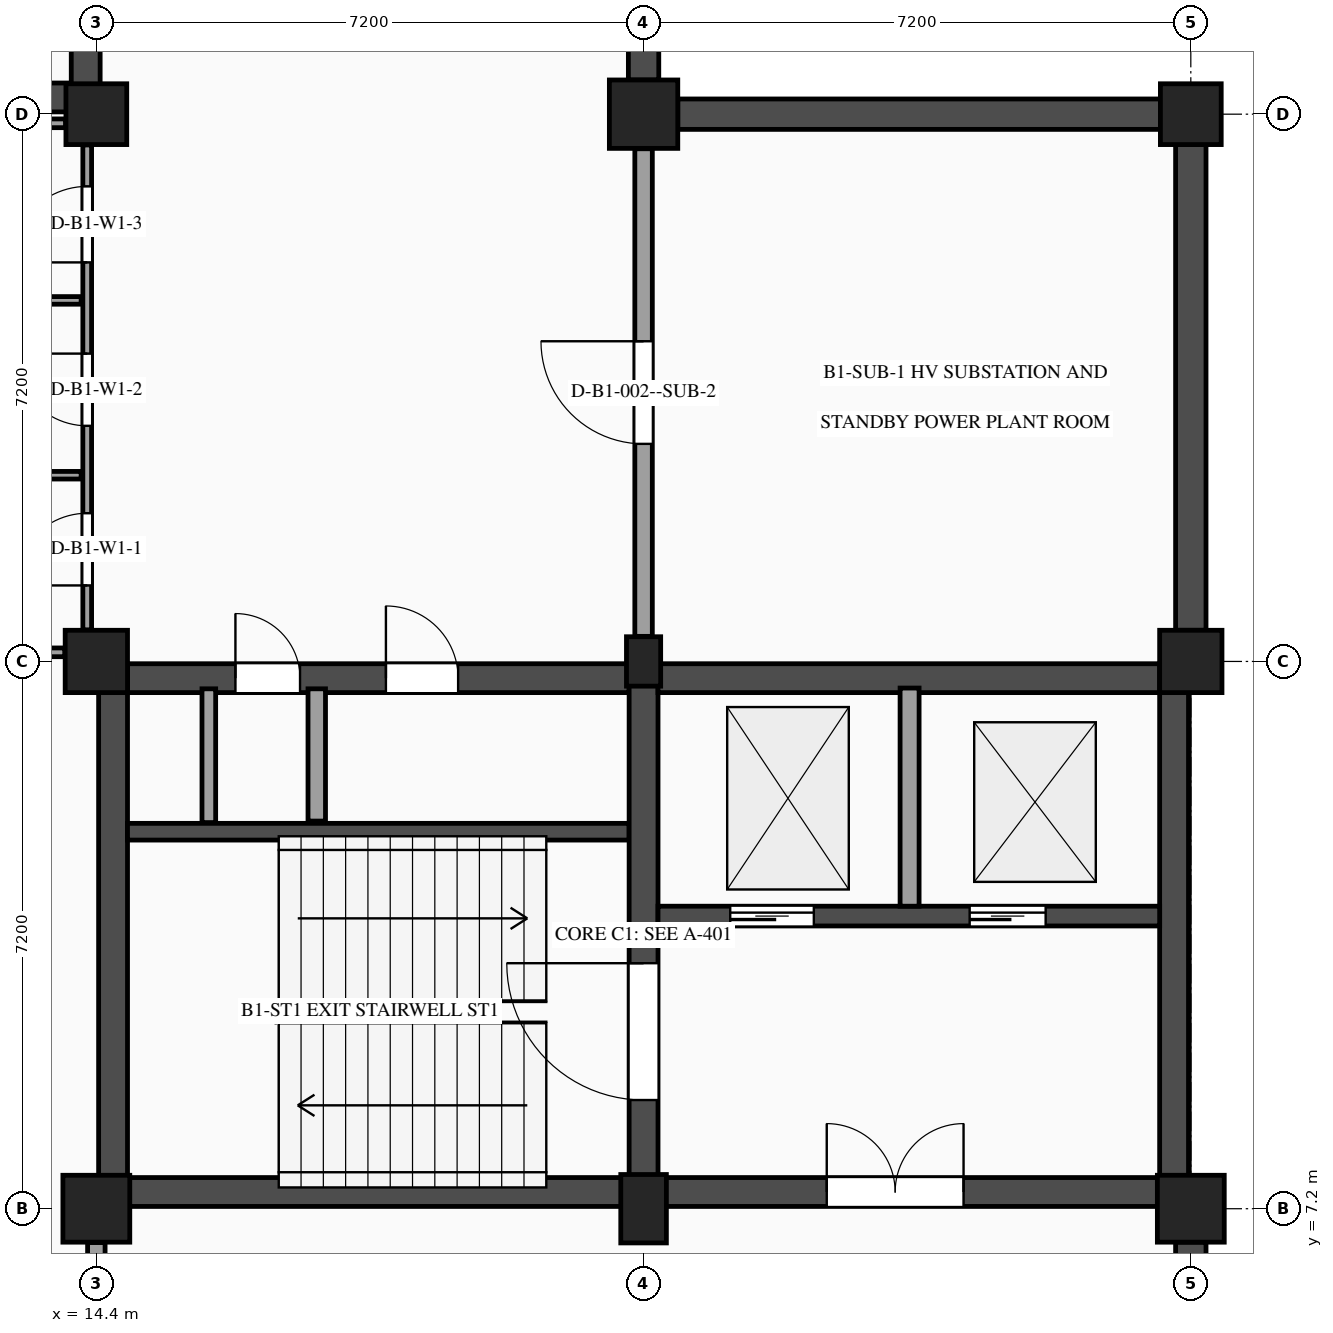
"""IFC4 building model, lengths in metres.
Left out: names, types, materials, properties, quantities, classifications, styles, units other than length and angle.
Written with IfcOpenShell. Run it as: python <this file> out.ifc"""

import sys

from ifc_helpers import new_model, si_unit, direction, frame, frame_2d, origin, origin_2d, place, context, subcontext, project, spatial, rectangle, extrude, element, fill, save


model = new_model("IFC4")
c1 = context("Model", 3, precision=1e-05, world=origin(), true_north=direction((0.0, 1.0)))
c2 = subcontext(c1, "Body", "Model", "MODEL_VIEW")
j1 = project(units=[si_unit("LENGTHUNIT", "METRE"), si_unit("PLANEANGLEUNIT", "RADIAN")], contexts=[c1])
p1 = place(None, origin())
s1 = spatial("IfcSite", under=j1, at=p1, CompositionType="ELEMENT")
p2 = place(p1, origin())
s2 = spatial("IfcBuilding", under=s1, at=p2, CompositionType="ELEMENT")
p3 = place(p2, frame((0.0, 0.0, -4.5)))
s3 = spatial("IfcBuildingStorey", under=s2, at=p3, CompositionType="ELEMENT", Elevation=-4.5)
p4 = place(p3, frame((14.4, 7.2, -0.45), z_axis=(0.0, 0.0, 1.0), x_axis=(1.0, 0.0, 0.0)))
e1 = element("IfcColumn", 1, at=p4, inside=s3, PredefinedType="COLUMN", context=c2, shape_type="SweptSolid", body=[
    extrude(rectangle(XDim=0.88, YDim=0.88, at=origin_2d()), origin(), (0.0, 0.0, 1.0), 4.95),
])
p5 = place(p3, frame((14.4, 14.4, -0.45), z_axis=(0.0, 0.0, 1.0), x_axis=(1.0, 0.0, 0.0)))
e2 = element("IfcColumn", 2, at=p5, inside=s3, PredefinedType="COLUMN", context=c2, shape_type="SweptSolid", body=[
    extrude(rectangle(XDim=0.82, YDim=0.82, at=origin_2d()), origin(), (0.0, 0.0, 1.0), 4.95),
])
p6 = place(p3, frame((14.4, 21.6, -0.45), z_axis=(0.0, 0.0, 1.0), x_axis=(1.0, 0.0, 0.0)))
e3 = element("IfcColumn", 3, at=p6, inside=s3, PredefinedType="COLUMN", context=c2, shape_type="SweptSolid", body=[
    extrude(rectangle(XDim=0.8, YDim=0.8, at=origin_2d()), origin(), (0.0, 0.0, 1.0), 4.95),
])
p7 = place(p3, frame((21.6, 7.2, -0.45), z_axis=(0.0, 0.0, 1.0), x_axis=(1.0, 0.0, 0.0)))
e4 = element("IfcColumn", 4, at=p7, inside=s3, PredefinedType="COLUMN", context=c2, shape_type="SweptSolid", body=[
    extrude(rectangle(XDim=0.6, YDim=0.9, at=origin_2d()), origin(), (0.0, 0.0, 1.0), 4.95),
])
p8 = place(p3, frame((21.6, 14.4, -0.45), z_axis=(0.0, 0.0, 1.0), x_axis=(1.0, 0.0, 0.0)))
e5 = element("IfcColumn", 5, at=p8, inside=s3, PredefinedType="PILASTER", context=c2, shape_type="SweptSolid", body=[
    extrude(rectangle(XDim=0.45, YDim=0.65, at=origin_2d()), origin(), (0.0, 0.0, 1.0), 4.95),
])
p9 = place(p3, frame((21.6, 21.6, -0.45), z_axis=(0.0, 0.0, 1.0), x_axis=(1.0, 0.0, 0.0)))
e6 = element("IfcColumn", 6, at=p9, inside=s3, PredefinedType="COLUMN", context=c2, shape_type="SweptSolid", body=[
    extrude(rectangle(XDim=0.9, YDim=0.9, at=origin_2d()), origin(), (0.0, 0.0, 1.0), 4.95),
])
p10 = place(p3, frame((28.8, 7.2, -0.45), z_axis=(0.0, 0.0, 1.0), x_axis=(1.0, 0.0, 0.0)))
e7 = element("IfcColumn", 7, at=p10, inside=s3, PredefinedType="COLUMN", context=c2, shape_type="SweptSolid", body=[
    extrude(rectangle(XDim=0.88, YDim=0.88, at=origin_2d()), origin(), (0.0, 0.0, 1.0), 4.95),
])
p11 = place(p3, frame((28.8, 14.4, -0.45), z_axis=(0.0, 0.0, 1.0), x_axis=(1.0, 0.0, 0.0)))
e8 = element("IfcColumn", 8, at=p11, inside=s3, PredefinedType="COLUMN", context=c2, shape_type="SweptSolid", body=[
    extrude(rectangle(XDim=0.82, YDim=0.82, at=origin_2d()), origin(), (0.0, 0.0, 1.0), 4.95),
])
p12 = place(p3, frame((28.8, 21.6, -0.45), z_axis=(0.0, 0.0, 1.0), x_axis=(1.0, 0.0, 0.0)))
e9 = element("IfcColumn", 9, at=p12, inside=s3, PredefinedType="COLUMN", context=c2, shape_type="SweptSolid", body=[
    extrude(rectangle(XDim=0.8, YDim=0.8, at=origin_2d()), origin(), (0.0, 0.0, 1.0), 4.95),
])
p13 = place(p3, frame((21.6, 28.36, 0.0), z_axis=(0.0, 0.0, 1.0), x_axis=(0.0, -1.0, 0.0)))
e10 = element("IfcWall", 10, at=p13, inside=s3, PredefinedType="SOLIDWALL", context=c2, shape_type="SweptSolid", body=[
    extrude(rectangle(XDim=6.31, YDim=0.4, at=frame_2d((3.155, 0.0))), origin(), (0.0, 0.0, 1.0), 4.17),
])
p14 = place(p3, frame((22.05, 21.6, 0.0), z_axis=(0.0, 0.0, 1.0), x_axis=(1.0, 0.0, 0.0)))
e11 = element("IfcWall", 11, at=p14, inside=s3, PredefinedType="SOLIDWALL", context=c2, shape_type="SweptSolid", body=[
    extrude(rectangle(XDim=6.35, YDim=0.4, at=frame_2d((3.175, 0.0))), origin(), (0.0, 0.0, 1.0), 4.17),
])
p15 = place(p3, frame((28.8, 21.2, 0.0), z_axis=(0.0, 0.0, 1.0), x_axis=(0.0, -1.0, 0.0)))
e12 = element("IfcWall", 12, at=p15, inside=s3, PredefinedType="SOLIDWALL", context=c2, shape_type="SweptSolid", body=[
    extrude(rectangle(XDim=6.39, YDim=0.4, at=frame_2d((3.195, 0.0))), origin(), (0.0, 0.0, 1.0), 4.17),
])
p16 = place(p3, frame((28.8, 6.76, 0.0), z_axis=(0.0, 0.0, 1.0), x_axis=(0.0, -1.0, 0.0)))
e13 = element("IfcWall", 13, at=p16, inside=s3, PredefinedType="SOLIDWALL", context=c2, shape_type="SweptSolid", body=[
    extrude(rectangle(XDim=6.31, YDim=0.4, at=frame_2d((3.155, 0.0))), origin(), (0.0, 0.0, 1.0), 4.17),
])
p17 = place(p3, frame((14.81, 7.42, 0.0), z_axis=(0.0, 0.0, 1.0), x_axis=(1.0, 0.0, 0.0)))
e14 = element("IfcWall", 14, at=p17, inside=s3, PredefinedType="SHEAR", context=c2, shape_type="SweptSolid", body=[
    extrude(rectangle(XDim=6.6, YDim=0.38, at=frame_2d((3.3, 0.0))), origin(), (0.0, 0.0, 1.0), 4.17),
])
p18 = place(p3, frame((14.62, 14.37, 0.0), z_axis=(0.0, 0.0, 1.0), x_axis=(0.0, -1.0, 0.0)))
e15 = element("IfcWall", 15, at=p18, inside=s3, PredefinedType="SHEAR", context=c2, shape_type="SweptSolid", body=[
    extrude(rectangle(XDim=7.14, YDim=0.38, at=frame_2d((3.57, 0.0))), origin(), (0.0, 0.0, 1.0), 4.17),
])
p19 = place(p3, frame((14.81, 14.18, 0.0), z_axis=(0.0, 0.0, 1.0), x_axis=(1.0, 0.0, 0.0)))
e16 = element("IfcWall", 16, at=p19, inside=s3, PredefinedType="SHEAR", context=c2, shape_type="SweptSolid", body=[
    extrude(rectangle(XDim=6.6, YDim=0.38, at=frame_2d((3.3, 0.0))), origin(), (0.0, 0.0, 1.0), 4.17),
])
p20 = place(p19, frame((1.42, 0.0, 0.0)))
e17 = element("IfcOpeningElement", 17, at=p20, cuts=e16, PredefinedType="OPENING", context=c2, shape_type="SweptSolid", body=[
    extrude(rectangle(XDim=0.85, YDim=2.1, at=frame_2d((0.425, 1.05))), frame((0.0, 0.2, 0.0), z_axis=(0.0, -1.0, 0.0), x_axis=(1.0, 0.0, 0.0)), (0.0, 0.0, 1.0), 0.4),
])
p21 = place(p19, frame((3.4, 0.0, 0.0)))
e18 = element("IfcOpeningElement", 18, at=p21, cuts=e16, PredefinedType="OPENING", context=c2, shape_type="SweptSolid", body=[
    extrude(rectangle(XDim=0.95, YDim=2.15, at=frame_2d((0.475, 1.075))), frame((0.0, 0.2, 0.0), z_axis=(0.0, -1.0, 0.0), x_axis=(1.0, 0.0, 0.0)), (0.0, 0.0, 1.0), 0.4),
])
p22 = place(p3, frame((14.81, 12.16, 0.0), z_axis=(0.0, 0.0, 1.0), x_axis=(1.0, 0.0, 0.0)))
e19 = element("IfcWall", 19, at=p22, inside=s3, PredefinedType="SHEAR", context=c2, shape_type="SweptSolid", body=[
    extrude(rectangle(XDim=6.6, YDim=0.22, at=frame_2d((3.3, 0.0))), origin(), (0.0, 0.0, 1.0), 4.17),
])
p23 = place(p3, frame((17.3, 12.3, 0.0), z_axis=(0.0, 0.0, 1.0), x_axis=(0.0, 1.0, 0.0)))
e20 = element("IfcWall", 20, at=p23, inside=s3, PredefinedType="PARTITIONING", context=c2, shape_type="SweptSolid", body=[
    extrude(rectangle(XDim=1.74, YDim=0.23, at=frame_2d((0.87, 0.0))), origin(), (0.0, 0.0, 1.0), 4.17),
])
p24 = place(p3, frame((15.88, 12.28, 0.0), z_axis=(0.0, 0.0, 1.0), x_axis=(0.0, 1.0, 0.0)))
e21 = element("IfcWall", 21, at=p24, inside=s3, PredefinedType="PARTITIONING", context=c2, shape_type="SweptSolid", body=[
    extrude(rectangle(XDim=1.76, YDim=0.18, at=frame_2d((0.88, 0.0))), origin(), (0.0, 0.0, 1.0), 4.17),
])
p25 = place(p3, frame((21.6, 7.23, 0.0), z_axis=(0.0, 0.0, 1.0), x_axis=(0.0, 1.0, 0.0)))
e22 = element("IfcWall", 22, at=p25, inside=s3, PredefinedType="SHEAR", context=c2, shape_type="SweptSolid", body=[
    extrude(rectangle(XDim=7.14, YDim=0.38, at=frame_2d((3.57, 0.0))), origin(), (0.0, 0.0, 1.0), 4.17),
])
p26 = place(p25, frame((1.4, 0.0, 0.0)))
e23 = element("IfcOpeningElement", 23, at=p26, cuts=e22, PredefinedType="OPENING", context=c2, shape_type="SweptSolid", body=[
    extrude(rectangle(XDim=1.8, YDim=2.2, at=frame_2d((0.9, 1.1))), frame((0.0, 0.2, 0.0), z_axis=(0.0, -1.0, 0.0), x_axis=(1.0, 0.0, 0.0)), (0.0, 0.0, 1.0), 0.4),
])
p27 = place(p3, frame((21.79, 7.42, 0.0), z_axis=(0.0, 0.0, 1.0), x_axis=(1.0, 0.0, 0.0)))
e24 = element("IfcWall", 24, at=p27, inside=s3, PredefinedType="SHEAR", context=c2, shape_type="SweptSolid", body=[
    extrude(rectangle(XDim=6.6, YDim=0.38, at=frame_2d((3.3, 0.0))), origin(), (0.0, 0.0, 1.0), 4.17),
])
p28 = place(p27, frame((2.22, 0.0, 0.0)))
e25 = element("IfcOpeningElement", 25, at=p28, cuts=e24, PredefinedType="OPENING", context=c2, shape_type="SweptSolid", body=[
    extrude(rectangle(XDim=1.8, YDim=2.2, at=frame_2d((0.9, 1.1))), frame((0.0, 0.2, 0.0), z_axis=(0.0, -1.0, 0.0), x_axis=(1.0, 0.0, 0.0)), (0.0, 0.0, 1.0), 0.4),
])
p29 = place(p3, frame((28.58, 7.23, 0.0), z_axis=(0.0, 0.0, 1.0), x_axis=(0.0, 1.0, 0.0)))
e26 = element("IfcWall", 26, at=p29, inside=s3, PredefinedType="SHEAR", context=c2, shape_type="SweptSolid", body=[
    extrude(rectangle(XDim=7.14, YDim=0.38, at=frame_2d((3.57, 0.0))), origin(), (0.0, 0.0, 1.0), 4.17),
])
p30 = place(p3, frame((21.79, 14.18, 0.0), z_axis=(0.0, 0.0, 1.0), x_axis=(1.0, 0.0, 0.0)))
e27 = element("IfcWall", 27, at=p30, inside=s3, PredefinedType="SHEAR", context=c2, shape_type="SweptSolid", body=[
    extrude(rectangle(XDim=6.6, YDim=0.38, at=frame_2d((3.3, 0.0))), origin(), (0.0, 0.0, 1.0), 4.17),
])
p31 = place(p3, frame((21.79, 11.05, 0.0), z_axis=(0.0, 0.0, 1.0), x_axis=(1.0, 0.0, 0.0)))
e28 = element("IfcWall", 28, at=p31, inside=s3, PredefinedType="SHEAR", context=c2, shape_type="SweptSolid", body=[
    extrude(rectangle(XDim=6.6, YDim=0.26, at=frame_2d((3.3, 0.0))), origin(), (0.0, 0.0, 1.0), 4.17),
])
p32 = place(p31, frame((0.95, 0.0, 0.0)))
e29 = element("IfcOpeningElement", 29, at=p32, cuts=e28, PredefinedType="OPENING", context=c2, shape_type="SweptSolid", body=[
    extrude(rectangle(XDim=1.1, YDim=2.2, at=frame_2d((0.55, 1.1))), frame((0.0, 0.14, 0.0), z_axis=(0.0, -1.0, 0.0), x_axis=(1.0, 0.0, 0.0)), (0.0, 0.0, 1.0), 0.28),
])
p33 = place(p31, frame((4.1, 0.0, 0.0)))
e30 = element("IfcOpeningElement", 30, at=p33, cuts=e28, PredefinedType="OPENING", context=c2, shape_type="SweptSolid", body=[
    extrude(rectangle(XDim=1.0, YDim=2.15, at=frame_2d((0.5, 1.075))), frame((0.0, 0.14, 0.0), z_axis=(0.0, -1.0, 0.0), x_axis=(1.0, 0.0, 0.0)), (0.0, 0.0, 1.0), 0.28),
])
p34 = place(p3, frame((25.1, 11.18, 0.0), z_axis=(0.0, 0.0, 1.0), x_axis=(0.0, 1.0, 0.0)))
e31 = element("IfcWall", 31, at=p34, inside=s3, PredefinedType="PARTITIONING", context=c2, shape_type="SweptSolid", body=[
    extrude(rectangle(XDim=2.87, YDim=0.25, at=frame_2d((1.435, 0.0))), origin(), (0.0, 0.0, 1.0), 4.17),
])
p35 = place(p3, frame((7.61, 21.82, 0.0), z_axis=(0.0, 0.0, 1.0), x_axis=(1.0, 0.0, 0.0)))
e32 = element("IfcWall", 32, at=p35, inside=s3, PredefinedType="SHEAR", context=c2, shape_type="SweptSolid", body=[
    extrude(rectangle(XDim=6.46, YDim=0.38, at=frame_2d((3.23, 0.0))), origin(), (0.0, 0.0, 1.0), 4.17),
])
p36 = place(p3, frame((14.26, 21.63, 0.0), z_axis=(0.0, 0.0, 1.0), x_axis=(0.0, 1.0, 0.0)))
e33 = element("IfcWall", 33, at=p36, inside=s3, PredefinedType="SHEAR", context=c2, shape_type="SweptSolid", body=[
    extrude(rectangle(XDim=7.14, YDim=0.38, at=frame_2d((3.57, 0.0))), origin(), (0.0, 0.0, 1.0), 4.17),
])
p37 = place(p36, frame((5.2, 0.0, 0.0)))
e34 = element("IfcOpeningElement", 34, at=p37, cuts=e33, PredefinedType="OPENING", context=c2, shape_type="SweptSolid", body=[
    extrude(rectangle(XDim=1.35, YDim=2.15, at=frame_2d((0.675, 1.075))), frame((0.0, 0.2, 0.0), z_axis=(0.0, -1.0, 0.0), x_axis=(1.0, 0.0, 0.0)), (0.0, 0.0, 1.0), 0.4),
])
p38 = place(p3, frame((7.43, 14.52, 0.0), z_axis=(0.0, 0.0, 1.0), x_axis=(1.0, 0.0, 0.0)))
e35 = element("IfcWall", 35, at=p38, inside=s3, PredefinedType="PARTITIONING", context=c2, shape_type="SweptSolid", body=[
    extrude(rectangle(XDim=6.555, YDim=0.115, at=frame_2d((3.278, 0.0))), origin(), (0.0, 0.0, 1.0), 3.39),
])
p39 = place(p3, frame((7.655, 21.48, 0.0), z_axis=(0.0, 0.0, 1.0), x_axis=(1.0, 0.0, 0.0)))
e36 = element("IfcWall", 36, at=p39, inside=s3, PredefinedType="PARTITIONING", context=c2, shape_type="SweptSolid", body=[
    extrude(rectangle(XDim=6.34, YDim=0.115, at=frame_2d((3.17, 0.0))), origin(), (0.0, 0.0, 1.0), 3.39),
])
p40 = place(p3, frame((14.28, 14.815, 0.0), z_axis=(0.0, 0.0, 1.0), x_axis=(0.0, 1.0, 0.0)))
e37 = element("IfcWall", 37, at=p40, inside=s3, PredefinedType="PARTITIONING", context=c2, shape_type="SweptSolid", body=[
    extrude(rectangle(XDim=6.38, YDim=0.115, at=frame_2d((3.19, 0.0))), origin(), (0.0, 0.0, 1.0), 3.485),
])
p41 = place(p40, frame((0.585, 0.0, 0.0)))
e38 = element("IfcOpeningElement", 38, at=p41, cuts=e37, PredefinedType="OPENING", context=c2, shape_type="SweptSolid", body=[
    extrude(rectangle(XDim=0.95, YDim=2.1, at=frame_2d((0.475, 1.05))), frame((0.0, 0.067, 0.0), z_axis=(0.0, -1.0, 0.0), x_axis=(1.0, 0.0, 0.0)), (0.0, 0.0, 1.0), 0.135),
])
p42 = place(p40, frame((2.685, 0.0, 0.0)))
e39 = element("IfcOpeningElement", 39, at=p42, cuts=e37, PredefinedType="OPENING", context=c2, shape_type="SweptSolid", body=[
    extrude(rectangle(XDim=0.95, YDim=2.1, at=frame_2d((0.475, 1.05))), frame((0.0, 0.067, 0.0), z_axis=(0.0, -1.0, 0.0), x_axis=(1.0, 0.0, 0.0)), (0.0, 0.0, 1.0), 0.135),
])
p43 = place(p40, frame((4.835, 0.0, 0.0)))
e40 = element("IfcOpeningElement", 40, at=p43, cuts=e37, PredefinedType="OPENING", context=c2, shape_type="SweptSolid", body=[
    extrude(rectangle(XDim=1.0, YDim=2.15, at=frame_2d((0.5, 1.075))), frame((0.0, 0.067, 0.0), z_axis=(0.0, -1.0, 0.0), x_axis=(1.0, 0.0, 0.0)), (0.0, 0.0, 1.0), 0.135),
])
for number, where, z_axis, x_axis in (
    (41, (7.4, 16.85, 0.0), (0.0, 0.0, 1.0), (1.0, 0.0, 0.0)),
    (42, (7.4, 19.15, 0.0), (0.0, 0.0, 1.0), (1.0, 0.0, 0.0)),
):
    element("IfcWall", number, at=place(p3, frame(where, z_axis=z_axis, x_axis=x_axis)), inside=s3, PredefinedType="PARTITIONING", context=c2, shape_type="SweptSolid", body=[
        extrude(rectangle(XDim=6.8, YDim=0.1, at=frame_2d((3.4, 0.0))), origin(), (0.0, 0.0, 1.0), 4.17),
    ])
p44 = place(p3, frame((14.4, 0.455, 0.0), z_axis=(0.0, 0.0, 1.0), x_axis=(0.0, 1.0, 0.0)))
e43 = element("IfcWall", 43, at=p44, inside=s3, PredefinedType="PARTITIONING", context=c2, shape_type="SweptSolid", body=[
    extrude(rectangle(XDim=6.3, YDim=0.23, at=frame_2d((3.15, 0.0))), origin(), (0.0, 0.0, 1.0), 3.54),
])
p45 = place(p44, frame((2.475, 0.0, 0.0)))
e44 = element("IfcOpeningElement", 44, at=p45, cuts=e43, PredefinedType="OPENING", context=c2, shape_type="SweptSolid", body=[
    extrude(rectangle(XDim=1.35, YDim=2.15, at=frame_2d((0.675, 1.075))), frame((0.0, 0.125, 0.0), z_axis=(0.0, -1.0, 0.0), x_axis=(1.0, 0.0, 0.0)), (0.0, 0.0, 1.0), 0.25),
])
p46 = place(p3, frame((21.6, 14.73, 0.0), z_axis=(0.0, 0.0, 1.0), x_axis=(0.0, 1.0, 0.0)))
e45 = element("IfcWall", 45, at=p46, inside=s3, PredefinedType="PARTITIONING", context=c2, shape_type="SweptSolid", body=[
    extrude(rectangle(XDim=6.415, YDim=0.23, at=frame_2d((3.208, 0.0))), origin(), (0.0, 0.0, 1.0), 3.485),
])
p47 = place(p46, frame((2.532, 0.0, 0.0)))
e46 = element("IfcOpeningElement", 46, at=p47, cuts=e45, PredefinedType="OPENING", context=c2, shape_type="SweptSolid", body=[
    extrude(rectangle(XDim=1.35, YDim=2.15, at=frame_2d((0.675, 1.075))), frame((0.0, 0.125, 0.0), z_axis=(0.0, -1.0, 0.0), x_axis=(1.0, 0.0, 0.0)), (0.0, 0.0, 1.0), 0.25),
])
p48 = place(p20, origin())
e47 = element("IfcDoor", 47, at=p48, inside=s3, OperationType="SINGLE_SWING_LEFT", PredefinedType="DOOR", context=c2, shape_type="SweptSolid", body=[
    extrude(rectangle(XDim=0.85, YDim=2.1, at=frame_2d((0.425, 1.05))), frame((0.0, 0.025, 0.0), z_axis=(0.0, -1.0, 0.0), x_axis=(1.0, 0.0, 0.0)), (0.0, 0.0, 1.0), 0.05),
])
fill(e17, e47)
p49 = place(p26, origin())
e48 = element("IfcDoor", 48, at=p49, inside=s3, OperationType="SINGLE_SWING_RIGHT", PredefinedType="DOOR", context=c2, shape_type="SweptSolid", body=[
    extrude(rectangle(XDim=1.8, YDim=2.2, at=frame_2d((0.9, 1.1))), frame((0.0, 0.025, 0.0), z_axis=(0.0, -1.0, 0.0), x_axis=(1.0, 0.0, 0.0)), (0.0, 0.0, 1.0), 0.05),
])
fill(e23, e48)
p50 = place(p21, origin())
e49 = element("IfcDoor", 49, at=p50, inside=s3, OperationType="SINGLE_SWING_LEFT", PredefinedType="DOOR", context=c2, shape_type="SweptSolid", body=[
    extrude(rectangle(XDim=0.95, YDim=2.15, at=frame_2d((0.475, 1.075))), frame((0.0, 0.025, 0.0), z_axis=(0.0, -1.0, 0.0), x_axis=(1.0, 0.0, 0.0)), (0.0, 0.0, 1.0), 0.05),
])
fill(e18, e49)
p51 = place(p32, origin())
e50 = element("IfcDoor", 50, at=p51, inside=s3, OperationType="SLIDING_TO_LEFT", PredefinedType="DOOR", context=c2, shape_type="SweptSolid", body=[
    extrude(rectangle(XDim=1.1, YDim=2.2, at=frame_2d((0.55, 1.1))), frame((0.0, 0.025, 0.0), z_axis=(0.0, -1.0, 0.0), x_axis=(1.0, 0.0, 0.0)), (0.0, 0.0, 1.0), 0.05),
])
fill(e29, e50)
p52 = place(p33, origin())
e51 = element("IfcDoor", 51, at=p52, inside=s3, OperationType="SLIDING_TO_RIGHT", PredefinedType="DOOR", context=c2, shape_type="SweptSolid", body=[
    extrude(rectangle(XDim=1.0, YDim=2.15, at=frame_2d((0.5, 1.075))), frame((0.0, 0.025, 0.0), z_axis=(0.0, -1.0, 0.0), x_axis=(1.0, 0.0, 0.0)), (0.0, 0.0, 1.0), 0.05),
])
fill(e30, e51)
p53 = place(p28, origin())
e52 = element("IfcDoor", 52, at=p53, inside=s3, OperationType="DOUBLE_DOOR_SINGLE_SWING", PredefinedType="DOOR", context=c2, shape_type="SweptSolid", body=[
    extrude(rectangle(XDim=1.8, YDim=2.2, at=frame_2d((0.9, 1.1))), frame((0.0, 0.025, 0.0), z_axis=(0.0, -1.0, 0.0), x_axis=(1.0, 0.0, 0.0)), (0.0, 0.0, 1.0), 0.05),
])
fill(e25, e52)
p54 = place(p41, origin())
e53 = element("IfcDoor", 53, at=p54, inside=s3, OperationType="SINGLE_SWING_LEFT", PredefinedType="DOOR", context=c2, shape_type="SweptSolid", body=[
    extrude(rectangle(XDim=0.95, YDim=2.1, at=frame_2d((0.475, 1.05))), frame((0.0, 0.025, 0.0), z_axis=(0.0, -1.0, 0.0), x_axis=(1.0, 0.0, 0.0)), (0.0, 0.0, 1.0), 0.05),
])
fill(e38, e53)
p55 = place(p42, origin())
e54 = element("IfcDoor", 54, at=p55, inside=s3, OperationType="SINGLE_SWING_RIGHT", PredefinedType="DOOR", context=c2, shape_type="SweptSolid", body=[
    extrude(rectangle(XDim=0.95, YDim=2.1, at=frame_2d((0.475, 1.05))), frame((0.0, 0.025, 0.0), z_axis=(0.0, -1.0, 0.0), x_axis=(1.0, 0.0, 0.0)), (0.0, 0.0, 1.0), 0.05),
])
fill(e39, e54)
p56 = place(p43, origin())
e55 = element("IfcDoor", 55, at=p56, inside=s3, OperationType="SINGLE_SWING_LEFT", PredefinedType="DOOR", context=c2, shape_type="SweptSolid", body=[
    extrude(rectangle(XDim=1.0, YDim=2.15, at=frame_2d((0.5, 1.075))), frame((0.0, 0.025, 0.0), z_axis=(0.0, -1.0, 0.0), x_axis=(1.0, 0.0, 0.0)), (0.0, 0.0, 1.0), 0.05),
])
fill(e40, e55)
p57 = place(p47, origin())
e56 = element("IfcDoor", 56, at=p57, inside=s3, OperationType="SINGLE_SWING_RIGHT", PredefinedType="DOOR", context=c2, shape_type="SweptSolid", body=[
    extrude(rectangle(XDim=1.35, YDim=2.15, at=frame_2d((0.675, 1.075))), frame((0.0, 0.025, 0.0), z_axis=(0.0, -1.0, 0.0), x_axis=(1.0, 0.0, 0.0)), (0.0, 0.0, 1.0), 0.05),
])
fill(e46, e56)
save(model, sys.argv[1])
